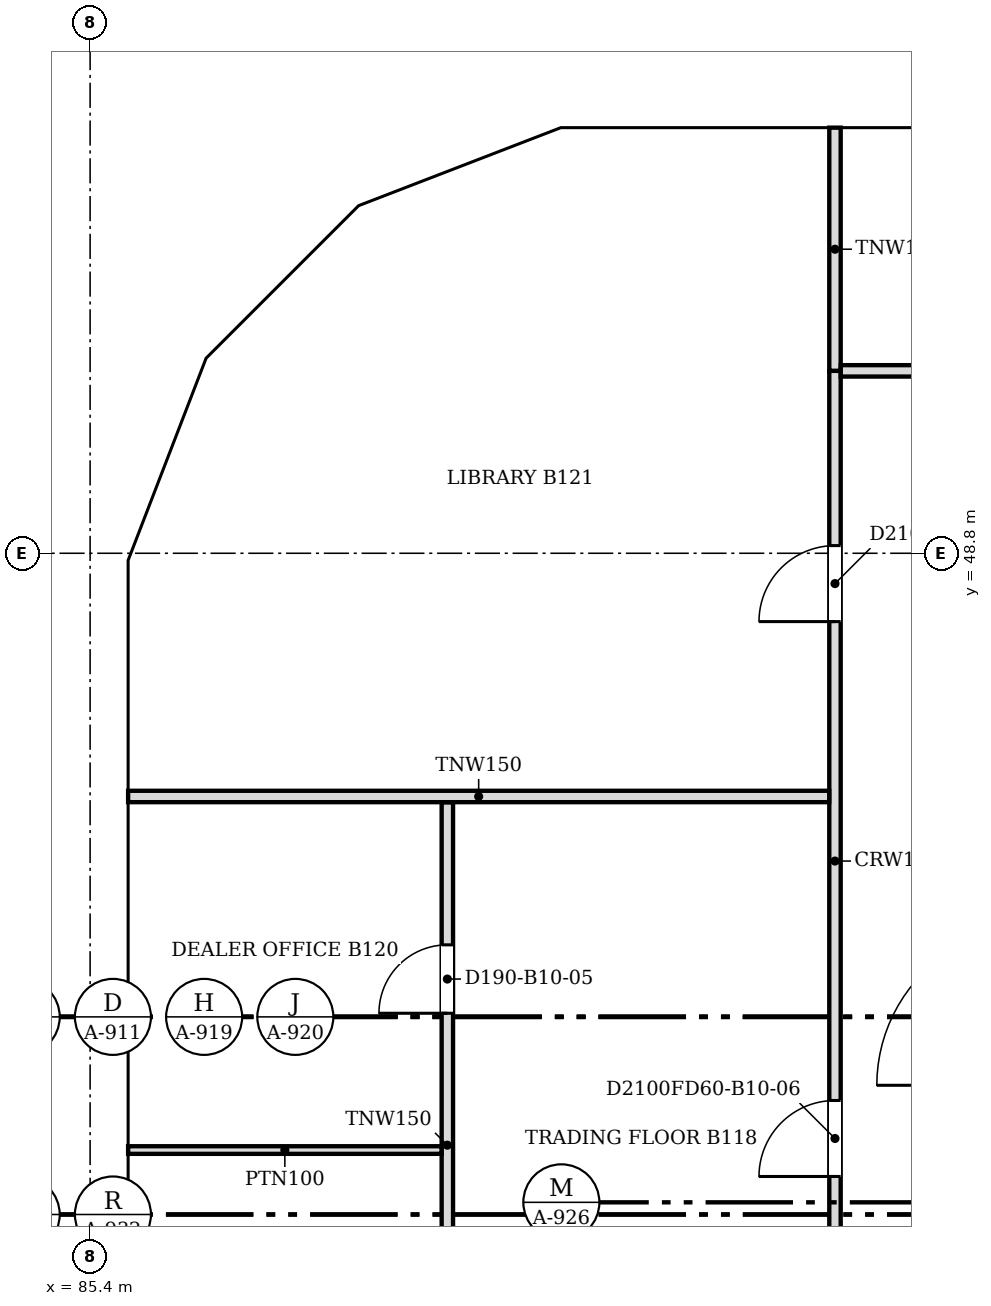
"""IFC4 building model, lengths in metres.
Left out: names, types, materials, properties, quantities, classifications, styles, units other than length and angle.
Written with IfcOpenShell. Run it as: python <this file> out.ifc"""

import sys

from ifc_helpers import new_model, si_unit, direction, frame, frame_2d, origin, place, context, subcontext, project, spatial, polyline, rectangle, outline, extrude, faceted_brep, source, transform, mapped, element, fill, save


model = new_model("IFC4")
c1 = context("Model", 3, precision=1e-05, world=origin(), true_north=direction((0.0, 1.0)))
c2 = subcontext(c1, "Body", "Model", "MODEL_VIEW")
j1 = project(units=[si_unit("LENGTHUNIT", "METRE"), si_unit("PLANEANGLEUNIT", "RADIAN")], contexts=[c1])
p1 = place(None, origin())
s1 = spatial("IfcSite", under=j1, at=p1, CompositionType="ELEMENT")
p2 = place(p1, origin())
s2 = spatial("IfcBuilding", under=s1, at=p2, CompositionType="ELEMENT")
p3 = place(p2, frame((0.0, 0.0, 95.2)))
s3 = spatial("IfcBuildingStorey", under=s2, at=p3, CompositionType="ELEMENT", Elevation=95.2)
m1 = source(origin(), c2, "Body", "Brep", [
    faceted_brep([(6.1, -0.25, 0.0), (3.05, -0.25, 3.8), (0.0, -0.25, 0.0), (6.1, -0.25, 0.0), (0.0, 0.25, 0.0), (3.05, 0.25, 3.8), (6.1, 0.25, 0.0), (6.1, 0.25, 0.0)], [[[0, 1, 2, 3]], [[4, 5, 6, 7]], [[6, 5, 1, 0]], [[5, 4, 2, 1]], [[4, 7, 3, 2]], [[3, 7, 6, 0]]]),
])
p4 = place(p3, frame((100.65, 54.65, 0.0), z_axis=(0.0, 0.0, 1.0), x_axis=(-1.0, 0.0, 0.0)))
e1 = element("IfcWall", 1, at=p4, inside=s3, PredefinedType="SOLIDWALL", context=c2, shape_type="MappedRepresentation", body=[
    mapped(m1, transform((0.0, 0.0, 0.0), scale=1.0)),
])
m2 = source(origin(), c2, "Body", "SweptSolid", [
    extrude(outline(polyline([(5.579, 0.25), (3.05, 3.401), (0.521, 0.25), (5.579, 0.25)])), frame((0.0, 0.26, 0.0), z_axis=(0.0, -1.0, 0.0), x_axis=(1.0, 0.0, 0.0)), (0.0, 0.0, 1.0), 0.52),
])
p5 = place(p4, origin())
e2 = element("IfcOpeningElement", 2, at=p5, cuts=e1, PredefinedType="OPENING", context=c2, shape_type="MappedRepresentation", body=[
    mapped(m2, transform((0.0, 0.0, 0.0), scale=1.0)),
])
m3 = source(origin(), c2, "Body", "Brep", [
    faceted_brep([(3.05, -0.25, 3.74), (3.003, -0.25, 3.8), (0.0, -0.25, 0.0), (3.05, -0.25, 0.0), (0.0, 0.25, 0.0), (2.957, 0.25, 3.741), (2.957, 0.25, 0.0), (3.003, 0.0, 3.8)], [[[0, 1, 2, 3]], [[4, 5, 6]], [[7, 1, 0]], [[5, 4, 2, 1, 7]], [[4, 6, 3, 2]], [[3, 6, 5, 7, 0]]]),
])
p6 = place(p3, frame((94.55, 54.65, 0.0), z_axis=(0.0, 0.0, 1.0), x_axis=(-1.0, 0.0, 0.0)))
e3 = element("IfcWall", 3, at=p6, inside=s3, PredefinedType="SOLIDWALL", context=c2, shape_type="MappedRepresentation", body=[
    mapped(m3, transform((0.0, 0.0, 0.0), scale=1.0)),
])
m4 = source(origin(), c2, "Body", "SweptSolid", [
    extrude(outline(polyline([(2.803, 3.144), (0.516, 0.25), (2.803, 0.25), (2.803, 3.144)])), frame((0.0, 0.26, 0.0), z_axis=(0.0, -1.0, 0.0), x_axis=(1.0, 0.0, 0.0)), (0.0, 0.0, 1.0), 0.52),
])
p7 = place(p6, origin())
e4 = element("IfcOpeningElement", 4, at=p7, cuts=e3, PredefinedType="OPENING", context=c2, shape_type="MappedRepresentation", body=[
    mapped(m4, transform((0.0, 0.0, 0.0), scale=1.0)),
])
m5 = source(origin(), c2, "Body", "Brep", [
    faceted_brep([(2.997, -0.25, 0.0), (0.047, -0.25, 3.8), (0.0, -0.25, 3.741), (0.0, -0.25, 0.0), (0.093, 0.25, 3.74), (2.944, 0.25, 0.068), (2.944, 0.25, 0.0), (0.093, 0.25, 0.0), (0.047, 0.0, 3.8), (2.997, 0.0, 0.0)], [[[0, 1, 2, 3]], [[4, 5, 6, 7]], [[5, 4, 8, 1, 0, 9]], [[2, 1, 8]], [[7, 6, 9, 0, 3]], [[7, 3, 2, 8, 4]], [[9, 6, 5]]]),
])
p8 = place(p3, frame((91.59, 54.667, 0.0), z_axis=(0.0, 0.0, 1.0), x_axis=(-0.933000876937, -0.359874094142, 0.0)))
e5 = element("IfcWall", 5, at=p8, inside=s3, PredefinedType="SOLIDWALL", context=c2, shape_type="MappedRepresentation", body=[
    mapped(m5, transform((0.0, 0.0, 0.0), scale=1.0)),
])
m6 = source(origin(), c2, "Body", "SweptSolid", [
    extrude(outline(polyline([(2.487, 0.25), (0.247, 3.135), (0.247, 0.25), (2.487, 0.25)])), frame((0.0, 0.26, 0.0), z_axis=(0.0, -1.0, 0.0), x_axis=(1.0, 0.0, 0.0)), (0.0, 0.0, 1.0), 0.52),
])
p9 = place(p8, origin())
e6 = element("IfcOpeningElement", 6, at=p9, cuts=e5, PredefinedType="OPENING", context=c2, shape_type="MappedRepresentation", body=[
    mapped(m6, transform((0.0, 0.0, 0.0), scale=1.0)),
])
m7 = source(origin(), c2, "Body", "Brep", [
    faceted_brep([(2.997, -0.25, 3.732), (2.944, -0.25, 3.8), (0.0, -0.25, 0.0), (2.997, -0.25, 0.0), (0.053, 0.25, 0.068), (2.891, 0.25, 3.732), (2.891, 0.25, 0.0), (0.053, 0.25, 0.0), (2.944, 0.0, 3.8), (0.0, 0.0, 0.0)], [[[0, 1, 2, 3]], [[4, 5, 6, 7]], [[8, 1, 0]], [[5, 4, 9, 2, 1, 8]], [[7, 6, 3, 2, 9]], [[7, 9, 4]], [[3, 6, 5, 8, 0]]]),
])
p10 = place(p3, frame((88.794, 53.588, 0.0), z_axis=(0.0, 0.0, 1.0), x_axis=(-0.707066050402, -0.707147509625, 0.0)))
e7 = element("IfcWall", 7, at=p10, inside=s3, PredefinedType="SOLIDWALL", context=c2, shape_type="MappedRepresentation", body=[
    mapped(m7, transform((0.0, 0.0, 0.0), scale=1.0)),
])
m8 = source(origin(), c2, "Body", "SweptSolid", [
    extrude(outline(polyline([(2.744, 3.134), (0.51, 0.25), (2.744, 0.25), (2.744, 3.134)])), frame((0.0, 0.26, 0.0), z_axis=(0.0, -1.0, 0.0), x_axis=(1.0, 0.0, 0.0)), (0.0, 0.0, 1.0), 0.52),
])
p11 = place(p10, origin())
e8 = element("IfcOpeningElement", 8, at=p11, cuts=e7, PredefinedType="OPENING", context=c2, shape_type="MappedRepresentation", body=[
    mapped(m8, transform((0.0, 0.0, 0.0), scale=1.0)),
])
m9 = source(origin(), c2, "Body", "Brep", [
    faceted_brep([(3.003, -0.25, 0.0), (0.053, -0.25, 3.8), (0.0, -0.25, 3.732), (0.0, -0.25, 0.0), (0.106, 0.25, 3.732), (2.957, 0.25, 0.06), (2.957, 0.25, 0.0), (0.106, 0.25, 0.0), (0.053, 0.0, 3.8), (3.003, 0.0, 0.0)], [[[0, 1, 2, 3]], [[4, 5, 6, 7]], [[5, 4, 8, 1, 0, 9]], [[2, 1, 8]], [[7, 6, 9, 0, 3]], [[7, 3, 2, 8, 4]], [[9, 6, 5]]]),
])
p12 = place(p3, frame((86.731, 51.556, 0.0), z_axis=(0.0, 0.0, 1.0), x_axis=(-0.359855894603, -0.933007896601, 0.0)))
e9 = element("IfcWall", 9, at=p12, inside=s3, PredefinedType="SOLIDWALL", context=c2, shape_type="MappedRepresentation", body=[
    mapped(m9, transform((0.0, 0.0, 0.0), scale=1.0)),
])
m10 = source(origin(), c2, "Body", "SweptSolid", [
    extrude(outline(polyline([(2.493, 0.25), (0.253, 3.135), (0.253, 0.25), (2.493, 0.25)])), frame((0.0, 0.26, 0.0), z_axis=(0.0, -1.0, 0.0), x_axis=(1.0, 0.0, 0.0)), (0.0, 0.0, 1.0), 0.52),
])
p13 = place(p12, origin())
e10 = element("IfcOpeningElement", 10, at=p13, cuts=e9, PredefinedType="OPENING", context=c2, shape_type="MappedRepresentation", body=[
    mapped(m10, transform((0.0, 0.0, 0.0), scale=1.0)),
])
m11 = source(origin(), c2, "Body", "Brep", [
    faceted_brep([(6.053, -0.25, 0.0), (3.003, -0.25, 3.8), (0.0, -0.25, 0.0), (0.047, 0.25, 0.059), (3.003, 0.25, 3.8), (6.053, 0.25, 0.0), (0.047, 0.25, 0.0), (0.0, 0.0, 0.0)], [[[0, 1, 2]], [[3, 4, 5, 6]], [[5, 4, 1, 0]], [[4, 3, 7, 2, 1]], [[6, 5, 0, 2, 7]], [[6, 7, 3]]]),
])
p14 = place(p3, frame((85.65, 48.753, 0.0), z_axis=(0.0, 0.0, 1.0), x_axis=(0.0, -1.0, 0.0)))
e11 = element("IfcWall", 11, at=p14, inside=s3, PredefinedType="SOLIDWALL", context=c2, shape_type="MappedRepresentation", body=[
    mapped(m11, transform((0.0, 0.0, 0.0), scale=1.0)),
])
m12 = source(origin(), c2, "Body", "SweptSolid", [
    extrude(outline(polyline([(5.532, 0.25), (3.005, 3.399), (0.516, 0.25), (5.532, 0.25)])), frame((0.0, 0.26, 0.0), z_axis=(0.0, -1.0, 0.0), x_axis=(1.0, 0.0, 0.0)), (0.0, 0.0, 1.0), 0.52),
])
p15 = place(p14, origin())
e12 = element("IfcOpeningElement", 12, at=p15, cuts=e11, PredefinedType="OPENING", context=c2, shape_type="MappedRepresentation", body=[
    mapped(m12, transform((0.0, 0.0, 0.0), scale=1.0)),
])
p16 = place(p3, frame((85.65, 42.7, 0.0), z_axis=(0.0, 0.0, 1.0), x_axis=(0.0, -1.0, 0.0)))
e13 = element("IfcWall", 13, at=p16, inside=s3, PredefinedType="SOLIDWALL", context=c2, shape_type="MappedRepresentation", body=[
    mapped(m1, transform((0.0, 0.0, 0.0), scale=1.0)),
])
p17 = place(p16, origin())
e14 = element("IfcOpeningElement", 14, at=p17, cuts=e13, PredefinedType="OPENING", context=c2, shape_type="MappedRepresentation", body=[
    mapped(m2, transform((0.0, 0.0, 0.0), scale=1.0)),
])
p18 = place(p2, frame((0.0, 0.0, 99.0)))
s4 = spatial("IfcBuildingStorey", under=s2, at=p18, CompositionType="ELEMENT", Elevation=99.0)
m13 = source(origin(), c2, "Body", "Brep", [
    faceted_brep([(3.05, -0.25, 0.0), (6.053, -0.25, 3.8), (3.05, -0.25, 7.6), (0.0, -0.25, 3.8), (0.0, 0.25, 3.8), (3.05, 0.25, 7.6), (6.007, 0.25, 3.859), (6.007, 0.25, 3.741), (3.05, 0.25, 0.0), (6.053, 0.0, 3.8)], [[[0, 1, 2, 3]], [[4, 5, 6, 7, 8]], [[8, 7, 9, 1, 0]], [[6, 5, 2, 1, 9]], [[5, 4, 3, 2]], [[4, 8, 0, 3]], [[9, 7, 6]]]),
])
p19 = place(p18, frame((97.6, 54.65, -3.8), z_axis=(0.0, 0.0, 1.0), x_axis=(-1.0, 0.0, 0.0)))
e15 = element("IfcWall", 15, at=p19, inside=s4, PredefinedType="SOLIDWALL", context=c2, shape_type="MappedRepresentation", body=[
    mapped(m13, transform((0.0, 0.0, 0.0), scale=1.0)),
])
m14 = source(origin(), c2, "Body", "SweptSolid", [
    extrude(outline(polyline([(3.049, 0.401), (5.735, 3.8), (3.049, 7.199), (0.321, 3.8), (3.049, 0.401)])), frame((0.0, 0.26, 0.0), z_axis=(0.0, -1.0, 0.0), x_axis=(1.0, 0.0, 0.0)), (0.0, 0.0, 1.0), 0.52),
])
p20 = place(p19, origin())
e16 = element("IfcOpeningElement", 16, at=p20, cuts=e15, PredefinedType="OPENING", context=c2, shape_type="MappedRepresentation", body=[
    mapped(m14, transform((0.0, 0.0, 0.0), scale=1.0)),
])
m15 = source(origin(), c2, "Body", "Brep", [
    faceted_brep([(2.95, -0.25, 0.0), (3.003, -0.25, 0.068), (3.003, -0.25, 7.532), (2.95, -0.25, 7.6), (0.0, -0.25, 3.8), (0.047, 0.25, 3.86), (2.898, 0.25, 7.532), (2.898, 0.25, 0.068), (0.047, 0.25, 3.74), (2.95, 0.0, 0.0), (2.95, 0.0, 7.6), (0.0, 0.0, 3.8)], [[[0, 1, 2, 3, 4]], [[5, 6, 7, 8]], [[1, 0, 9]], [[10, 3, 2]], [[6, 5, 11, 4, 3, 10]], [[8, 7, 9, 0, 4, 11]], [[8, 11, 5]], [[1, 9, 7, 6, 10, 2]]]),
])
p21 = place(p18, frame((91.547, 54.65, -3.8), z_axis=(0.0, 0.0, 1.0), x_axis=(-0.933007896601, -0.359855894603, 0.0)))
e17 = element("IfcWall", 17, at=p21, inside=s4, PredefinedType="SOLIDWALL", context=c2, shape_type="MappedRepresentation", body=[
    mapped(m15, transform((0.0, 0.0, 0.0), scale=1.0)),
])
m16 = source(origin(), c2, "Body", "SweptSolid", [
    extrude(outline(polyline([(2.75, 6.935), (0.316, 3.8), (2.75, 0.665), (2.75, 6.935)])), frame((0.0, 0.26, 0.0), z_axis=(0.0, -1.0, 0.0), x_axis=(1.0, 0.0, 0.0)), (0.0, 0.0, 1.0), 0.52),
])
p22 = place(p21, origin())
e18 = element("IfcOpeningElement", 18, at=p22, cuts=e17, PredefinedType="OPENING", context=c2, shape_type="MappedRepresentation", body=[
    mapped(m16, transform((0.0, 0.0, 0.0), scale=1.0)),
])
m17 = source(origin(), c2, "Body", "Brep", [
    faceted_brep([(0.053, -0.25, 0.0), (2.997, -0.25, 3.8), (0.053, -0.25, 7.6), (0.0, -0.25, 7.532), (0.0, -0.25, 0.068), (0.106, 0.25, 7.532), (2.944, 0.25, 3.868), (2.944, 0.25, 3.732), (0.106, 0.25, 0.068), (2.997, 0.0, 3.8), (0.053, 0.0, 0.0), (0.053, 0.0, 7.6)], [[[0, 1, 2, 3, 4]], [[5, 6, 7, 8]], [[8, 7, 9, 1, 0, 10]], [[6, 5, 11, 2, 1, 9]], [[3, 2, 11]], [[10, 0, 4]], [[8, 10, 4, 3, 11, 5]], [[9, 7, 6]]]),
])
p23 = place(p18, frame((88.831, 53.625, -3.8), z_axis=(0.0, 0.0, 1.0), x_axis=(-0.707147509625, -0.707066050402, 0.0)))
e19 = element("IfcWall", 19, at=p23, inside=s4, PredefinedType="SOLIDWALL", context=c2, shape_type="MappedRepresentation", body=[
    mapped(m17, transform((0.0, 0.0, 0.0), scale=1.0)),
])
m18 = source(origin(), c2, "Body", "SweptSolid", [
    extrude(outline(polyline([(0.253, 0.666), (2.681, 3.8), (0.253, 6.934), (0.253, 0.666)])), frame((0.0, 0.26, 0.0), z_axis=(0.0, -1.0, 0.0), x_axis=(1.0, 0.0, 0.0)), (0.0, 0.0, 1.0), 0.52),
])
p24 = place(p23, origin())
e20 = element("IfcOpeningElement", 20, at=p24, cuts=e19, PredefinedType="OPENING", context=c2, shape_type="MappedRepresentation", body=[
    mapped(m18, transform((0.0, 0.0, 0.0), scale=1.0)),
])
m19 = source(origin(), c2, "Body", "Brep", [
    faceted_brep([(2.95, -0.25, 0.0), (2.997, -0.25, 0.059), (2.997, -0.25, 7.541), (2.95, -0.25, 7.6), (0.0, -0.25, 3.8), (0.053, 0.25, 3.868), (2.904, 0.25, 7.54), (2.904, 0.25, 0.06), (0.053, 0.25, 3.732), (2.95, 0.0, 0.0), (2.95, 0.0, 7.6), (0.0, 0.0, 3.8)], [[[0, 1, 2, 3, 4]], [[5, 6, 7, 8]], [[1, 0, 9]], [[10, 3, 2]], [[6, 5, 11, 4, 3, 10]], [[8, 7, 9, 0, 4, 11]], [[8, 11, 5]], [[1, 9, 7, 6, 10, 2]]]),
])
p25 = place(p18, frame((86.712, 51.506, -3.8), z_axis=(0.0, 0.0, 1.0), x_axis=(-0.359874094142, -0.933000876937, 0.0)))
e21 = element("IfcWall", 21, at=p25, inside=s4, PredefinedType="SOLIDWALL", context=c2, shape_type="MappedRepresentation", body=[
    mapped(m19, transform((0.0, 0.0, 0.0), scale=1.0)),
])
p26 = place(p25, origin())
e22 = element("IfcOpeningElement", 22, at=p26, cuts=e21, PredefinedType="OPENING", context=c2, shape_type="MappedRepresentation", body=[
    mapped(m16, transform((0.0, 0.0, 0.0), scale=1.0)),
])
m20 = source(origin(), c2, "Body", "Brep", [
    faceted_brep([(0.047, -0.25, 0.0), (3.05, -0.25, 3.8), (0.047, -0.25, 7.6), (0.0, -0.25, 7.54), (0.0, -0.25, 0.06), (0.093, 0.25, 7.541), (3.05, 0.25, 3.8), (0.093, 0.25, 0.059), (0.047, 0.0, 0.0), (0.047, 0.0, 7.6)], [[[0, 1, 2, 3, 4]], [[5, 6, 7]], [[7, 6, 1, 0, 8]], [[6, 5, 9, 2, 1]], [[3, 2, 9]], [[8, 0, 4]], [[7, 8, 4, 3, 9, 5]]]),
])
p27 = place(p18, frame((85.65, 48.8, -3.8), z_axis=(0.0, 0.0, 1.0), x_axis=(0.0, -1.0, 0.0)))
e23 = element("IfcWall", 23, at=p27, inside=s4, PredefinedType="SOLIDWALL", context=c2, shape_type="MappedRepresentation", body=[
    mapped(m20, transform((0.0, 0.0, 0.0), scale=1.0)),
])
m21 = source(origin(), c2, "Body", "SweptSolid", [
    extrude(outline(polyline([(0.247, 0.656), (2.731, 3.8), (0.247, 6.944), (0.247, 0.656)])), frame((0.0, 0.26, 0.0), z_axis=(0.0, -1.0, 0.0), x_axis=(1.0, 0.0, 0.0)), (0.0, 0.0, 1.0), 0.52),
])
p28 = place(p27, origin())
e24 = element("IfcOpeningElement", 24, at=p28, cuts=e23, PredefinedType="OPENING", context=c2, shape_type="MappedRepresentation", body=[
    mapped(m21, transform((0.0, 0.0, 0.0), scale=1.0)),
])
m22 = source(origin(), c2, "Body", "SweptSolid", [
    extrude(outline(polyline([(3.05, 0.0), (6.1, 3.8), (3.05, 7.6), (0.0, 3.8), (3.05, 0.0)])), frame((0.0, 0.25, 0.0), z_axis=(0.0, -1.0, 0.0), x_axis=(1.0, 0.0, 0.0)), (0.0, 0.0, 1.0), 0.5),
])
p29 = place(p18, frame((85.65, 45.75, -3.8), z_axis=(0.0, 0.0, 1.0), x_axis=(0.0, -1.0, 0.0)))
e25 = element("IfcWall", 25, at=p29, inside=s4, PredefinedType="SOLIDWALL", context=c2, shape_type="MappedRepresentation", body=[
    mapped(m22, transform((0.0, 0.0, 0.0), scale=1.0)),
])
m23 = source(origin(), c2, "Body", "SweptSolid", [
    extrude(outline(polyline([(3.05, 0.399), (5.78, 3.8), (3.05, 7.201), (0.321, 3.8), (3.05, 0.399)])), frame((0.0, 0.26, 0.0), z_axis=(0.0, -1.0, 0.0), x_axis=(1.0, 0.0, 0.0)), (0.0, 0.0, 1.0), 0.52),
])
p30 = place(p29, origin())
e26 = element("IfcOpeningElement", 26, at=p30, cuts=e25, PredefinedType="OPENING", context=c2, shape_type="MappedRepresentation", body=[
    mapped(m23, transform((0.0, 0.0, 0.0), scale=1.0)),
])
p31 = place(p3, frame((95.2, 36.6, 0.0), z_axis=(0.0, 0.0, 1.0), x_axis=(0.0, 1.0, 0.0)))
e27 = element("IfcWall", 27, at=p31, inside=s3, PredefinedType="PARTITIONING", context=c2, shape_type="SweptSolid", body=[
    extrude(rectangle(XDim=14.6, YDim=0.15, at=frame_2d((7.3, 0.0))), origin(), (0.0, 0.0, 1.0), 3.067),
])
m24 = source(origin(), c2, "Body", "SweptSolid", [
    extrude(rectangle(XDim=1.0, YDim=2.1, at=frame_2d((0.5, 1.05))), frame((0.0, 0.085, 0.0), z_axis=(0.0, -1.0, 0.0), x_axis=(1.0, 0.0, 0.0)), (0.0, 0.0, 1.0), 0.17),
])
p32 = place(p31, frame((11.301, 0.0, 0.0)))
e28 = element("IfcOpeningElement", 28, at=p32, cuts=e27, PredefinedType="OPENING", context=c2, shape_type="MappedRepresentation", body=[
    mapped(m24, transform((0.0, 0.0, 0.0), scale=1.0)),
])
p33 = place(p31, frame((4.0, 0.0, 0.0)))
e29 = element("IfcOpeningElement", 29, at=p33, cuts=e27, PredefinedType="OPENING", context=c2, shape_type="MappedRepresentation", body=[
    mapped(m24, transform((0.0, 0.0, 0.0), scale=1.0)),
])
p34 = place(p3, frame((90.1, 36.676, 0.0), z_axis=(0.0, 0.0, 1.0), x_axis=(0.0, 1.0, 0.0)))
e30 = element("IfcWall", 30, at=p34, inside=s3, PredefinedType="PARTITIONING", context=c2, shape_type="SweptSolid", body=[
    extrude(rectangle(XDim=8.848, YDim=0.15, at=frame_2d((4.424, 0.0))), origin(), (0.0, 0.0, 1.0), 3.067),
])
m25 = source(origin(), c2, "Body", "SweptSolid", [
    extrude(rectangle(XDim=0.9, YDim=2.1, at=frame_2d((0.45, 1.05))), frame((0.0, 0.085, 0.0), z_axis=(0.0, -1.0, 0.0), x_axis=(1.0, 0.0, 0.0)), (0.0, 0.0, 1.0), 0.17),
])
p35 = place(p34, frame((1.7, 0.0, 0.0)))
e31 = element("IfcOpeningElement", 31, at=p35, cuts=e30, PredefinedType="OPENING", context=c2, shape_type="MappedRepresentation", body=[
    mapped(m25, transform((0.0, 0.0, 0.0), scale=1.0)),
])
p36 = place(p34, frame((6.072, 0.0, 0.0)))
e32 = element("IfcOpeningElement", 32, at=p36, cuts=e30, PredefinedType="OPENING", context=c2, shape_type="MappedRepresentation", body=[
    mapped(m25, transform((0.0, 0.0, 0.0), scale=1.0)),
])
p37 = place(p3, frame((85.9, 40.948, 0.0), z_axis=(0.0, 0.0, 1.0), x_axis=(1.0, 0.0, 0.0)))
e33 = element("IfcWall", 33, at=p37, inside=s3, PredefinedType="PARTITIONING", context=c2, shape_type="SweptSolid", body=[
    extrude(rectangle(XDim=4.124, YDim=0.1, at=frame_2d((2.062, 0.0))), origin(), (0.0, 0.0, 1.0), 3.067),
])
p38 = place(p3, frame((85.9, 45.6, 0.0), z_axis=(0.0, 0.0, 1.0), x_axis=(1.0, 0.0, 0.0)))
e34 = element("IfcWall", 34, at=p38, inside=s3, PredefinedType="PARTITIONING", context=c2, shape_type="SweptSolid", body=[
    extrude(rectangle(XDim=9.224, YDim=0.15, at=frame_2d((4.612, 0.0))), origin(), (0.0, 0.0, 1.0), 3.067),
])
p39 = place(p3, frame((95.2, 51.201, 0.0), z_axis=(0.0, 0.0, 1.0), x_axis=(0.0, 1.0, 0.0)))
e35 = element("IfcWall", 35, at=p39, inside=s3, PredefinedType="PARTITIONING", context=c2, shape_type="SweptSolid", body=[
    extrude(rectangle(XDim=3.199, YDim=0.15, at=frame_2d((1.6, 0.0))), origin(), (0.0, 0.0, 1.0), 3.067),
])
p40 = place(p3, frame((95.276, 51.2, 0.0), z_axis=(0.0, 0.0, 1.0), x_axis=(1.0, 0.0, 0.0)))
e36 = element("IfcWall", 36, at=p40, inside=s3, PredefinedType="PARTITIONING", context=c2, shape_type="SweptSolid", body=[
    extrude(rectangle(XDim=4.724, YDim=0.15, at=frame_2d((2.362, 0.0))), origin(), (0.0, 0.0, 1.0), 3.067),
])
p41 = place(p40, frame((1.9, 0.0, 0.0)))
e37 = element("IfcOpeningElement", 37, at=p41, cuts=e36, PredefinedType="OPENING", context=c2, shape_type="MappedRepresentation", body=[
    mapped(m25, transform((0.0, 0.0, 0.0), scale=1.0)),
])
m26 = source(origin(), c2, "Body", "SweptSolid", [
    extrude(rectangle(XDim=0.9, YDim=2.1, at=frame_2d((0.45, 1.05))), frame((0.0, 0.025, 0.0), z_axis=(0.0, -1.0, 0.0), x_axis=(1.0, 0.0, 0.0)), (0.0, 0.0, 1.0), 0.05),
])
p42 = place(p36, origin())
e38 = element("IfcDoor", 38, at=p42, inside=s3, OperationType="SINGLE_SWING_LEFT", PredefinedType="DOOR", context=c2, shape_type="MappedRepresentation", body=[
    mapped(m26, transform((0.0, 0.0, 0.0), scale=1.0)),
])
fill(e32, e38)
m27 = source(origin(), c2, "Body", "SweptSolid", [
    extrude(rectangle(XDim=1.0, YDim=2.1, at=frame_2d((0.5, 1.05))), frame((0.0, 0.025, 0.0), z_axis=(0.0, -1.0, 0.0), x_axis=(1.0, 0.0, 0.0)), (0.0, 0.0, 1.0), 0.05),
])
p43 = place(p32, origin())
e39 = element("IfcDoor", 39, at=p43, inside=s3, OperationType="SINGLE_SWING_LEFT", PredefinedType="DOOR", context=c2, shape_type="MappedRepresentation", body=[
    mapped(m27, transform((0.0, 0.0, 0.0), scale=1.0)),
])
fill(e28, e39)
p44 = place(p33, origin())
e40 = element("IfcDoor", 40, at=p44, inside=s3, OperationType="SINGLE_SWING_LEFT", PredefinedType="DOOR", context=c2, shape_type="MappedRepresentation", body=[
    mapped(m27, transform((0.0, 0.0, 0.0), scale=1.0)),
])
fill(e29, e40)
save(model, sys.argv[1])
